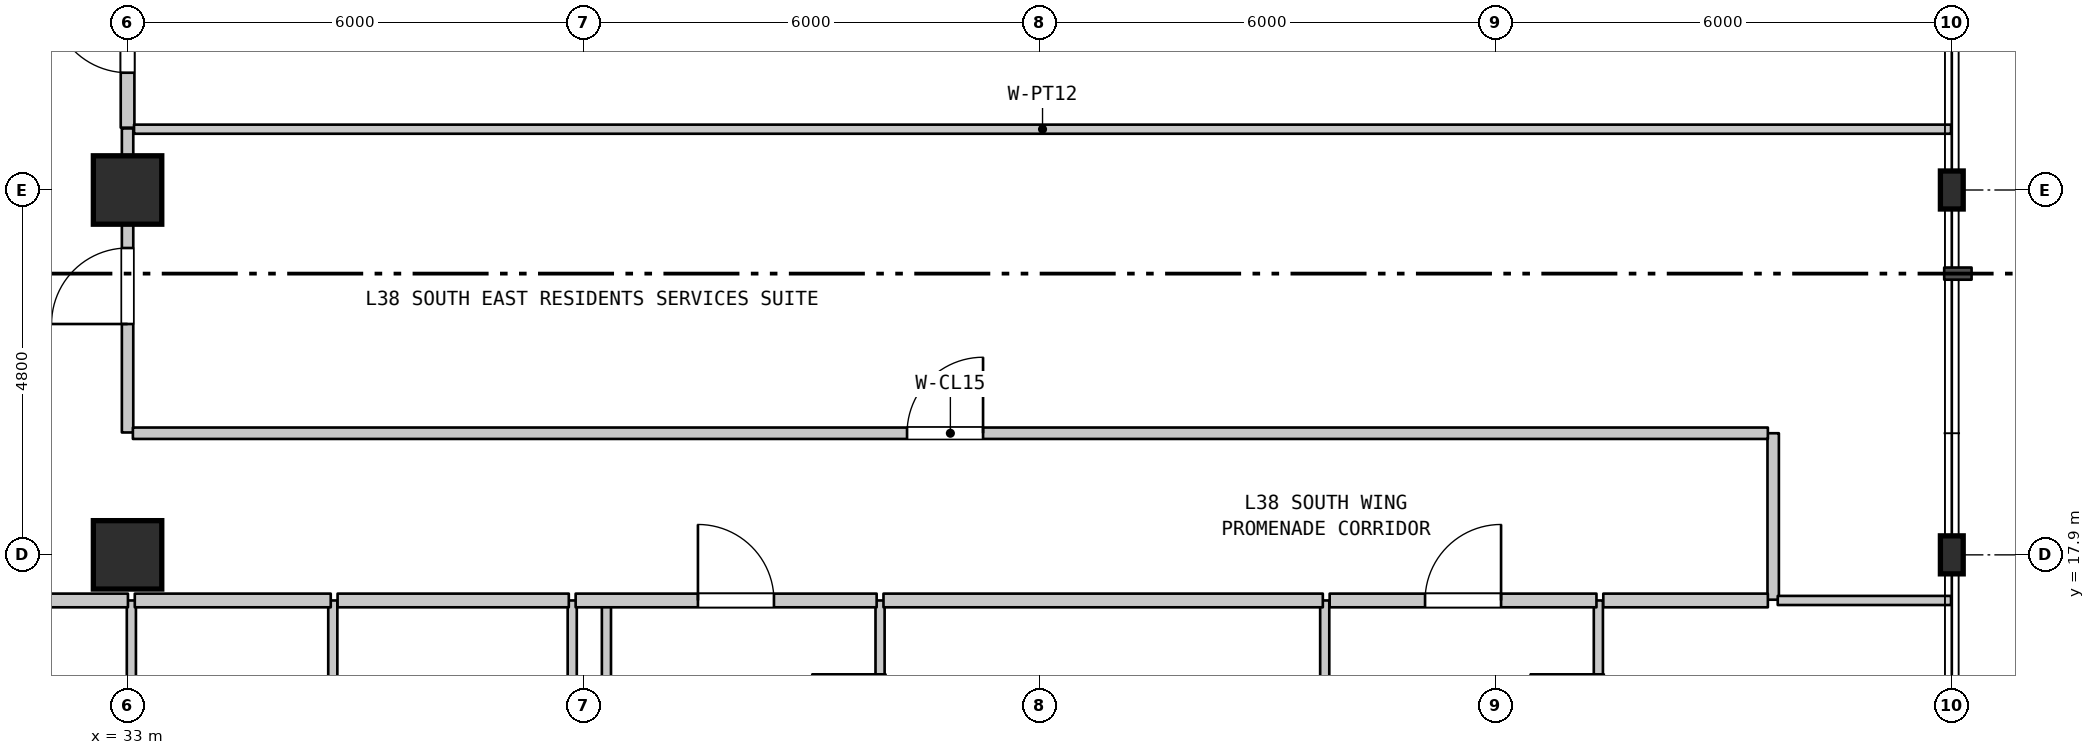
"""IFC4 building model, lengths in metres.
Left out: names, types, materials, properties, quantities, classifications, styles, units other than length and angle.
Written with IfcOpenShell. Run it as: python <this file> out.ifc"""

import sys

from ifc_helpers import new_model, si_unit, direction, frame, frame_2d, origin, origin_2d, place, context, subcontext, project, spatial, rectangle, i_section, extrude, element, fill, save


model = new_model("IFC4")
c1 = context("Model", 3, precision=1e-05, world=origin(), true_north=direction((0.0, 1.0)))
c2 = subcontext(c1, "Body", "Model", "MODEL_VIEW")
j1 = project(units=[si_unit("LENGTHUNIT", "METRE"), si_unit("PLANEANGLEUNIT", "RADIAN")], contexts=[c1])
p1 = place(None, origin())
s1 = spatial("IfcSite", under=j1, at=p1, CompositionType="ELEMENT")
p2 = place(p1, origin())
s2 = spatial("IfcBuilding", under=s1, at=p2, CompositionType="ELEMENT")
p3 = place(p2, frame((0.0, 0.0, 155.7)))
s3 = spatial("IfcBuildingStorey", under=s2, at=p3, CompositionType="ELEMENT", Elevation=155.7)
for number, where, z_axis, x_axis in (
    (1, (33.0, 17.9, 0.0), (0.0, 0.0, 1.0), (1.0, 0.0, 0.0)),
    (2, (33.0, 22.7, 0.0), (0.0, 0.0, 1.0), (1.0, 0.0, 0.0)),
):
    element("IfcColumn", number, at=place(p3, frame(where, z_axis=z_axis, x_axis=x_axis)), inside=s3, PredefinedType="COLUMN", context=c2, shape_type="SweptSolid", body=[
        extrude(rectangle(XDim=0.9, YDim=0.9, at=origin_2d()), origin(), (0.0, 0.0, 1.0), 3.7),
    ])
for number, where, z_axis, x_axis in (
    (3, (57.0, 17.9, 0.0), (0.0, 0.0, 1.0), (1.0, 0.0, 0.0)),
    (4, (57.0, 22.7, 0.0), (0.0, 0.0, 1.0), (1.0, 0.0, 0.0)),
):
    element("IfcColumn", number, at=place(p3, frame(where, z_axis=z_axis, x_axis=x_axis)), inside=s3, PredefinedType="COLUMN", context=c2, shape_type="SweptSolid", body=[
        extrude(i_section(OverallWidth=0.3, OverallDepth=0.5, WebThickness=0.014, FlangeThickness=0.028, FilletRadius=0.027, at=origin_2d()), origin(), (0.0, 0.0, 1.0), 3.7),
    ])
p4 = place(p3, frame((33.0, 19.51, 0.0), z_axis=(0.0, 0.0, 1.0), x_axis=(0.0, 1.0, 0.0)))
e5 = element("IfcWall", 5, at=p4, inside=s3, PredefinedType="STANDARD", context=c2, shape_type="SweptSolid", body=[
    extrude(rectangle(XDim=4.0, YDim=0.15, at=frame_2d((2.0, 0.0))), origin(), (0.0, 0.0, 1.0), 2.78),
])
p5 = place(p4, frame((1.427, 0.0, 0.0)))
e6 = element("IfcOpeningElement", 6, at=p5, cuts=e5, PredefinedType="OPENING", context=c2, shape_type="SweptSolid", body=[
    extrude(rectangle(XDim=1.0, YDim=2.15, at=frame_2d((0.5, 1.075))), frame((0.0, 0.085, 0.0), z_axis=(0.0, -1.0, 0.0), x_axis=(1.0, 0.0, 0.0)), (0.0, 0.0, 1.0), 0.17),
])
p6 = place(p3, frame((33.0, 23.52, 0.0), z_axis=(0.0, 0.0, 1.0), x_axis=(0.0, 1.0, 0.0)))
e7 = element("IfcWall", 7, at=p6, inside=s3, PredefinedType="STANDARD", context=c2, shape_type="SweptSolid", body=[
    extrude(rectangle(XDim=2.6, YDim=0.18, at=frame_2d((1.3, 0.0))), origin(), (0.0, 0.0, 1.0), 2.78),
])
p7 = place(p6, frame((0.723, 0.0, 0.0)))
e8 = element("IfcOpeningElement", 8, at=p7, cuts=e7, PredefinedType="OPENING", context=c2, shape_type="SweptSolid", body=[
    extrude(rectangle(XDim=1.0, YDim=2.15, at=frame_2d((0.5, 1.075))), frame((0.0, 0.1, 0.0), z_axis=(0.0, -1.0, 0.0), x_axis=(1.0, 0.0, 0.0)), (0.0, 0.0, 1.0), 0.2),
])
p8 = place(p3, frame((33.05, 11.15, 0.0), z_axis=(0.0, 0.0, 1.0), x_axis=(0.0, 1.0, 0.0)))
e9 = element("IfcWall", 9, at=p8, inside=s3, PredefinedType="PARTITIONING", context=c2, shape_type="SweptSolid", body=[
    extrude(rectangle(XDim=6.15, YDim=0.12, at=frame_2d((3.075, 0.0))), origin(), (0.0, 0.0, 1.0), 2.78),
])
for number, where, z_axis, x_axis in (
    (10, (35.7, 11.15, 0.0), (0.0, 0.0, 1.0), (0.0, 1.0, 0.0)),
    (11, (38.85, 11.15, 0.0), (0.0, 0.0, 1.0), (0.0, 1.0, 0.0)),
):
    element("IfcWall", number, at=place(p3, frame(where, z_axis=z_axis, x_axis=x_axis)), inside=s3, PredefinedType="PARTITIONING", context=c2, shape_type="SweptSolid", body=[
        extrude(rectangle(XDim=6.15, YDim=0.12, at=frame_2d((3.075, 0.0))), origin(), (0.0, 0.0, 1.0), 3.28),
    ])
p9 = place(p3, frame((39.3, 0.71, 0.0), z_axis=(0.0, 0.0, 1.0), x_axis=(0.0, 1.0, 0.0)))
e12 = element("IfcWall", 12, at=p9, inside=s3, PredefinedType="PARTITIONING", context=c2, shape_type="SweptSolid", body=[
    extrude(rectangle(XDim=16.59, YDim=0.12, at=frame_2d((8.295, 0.0))), origin(), (0.0, 0.0, 1.0), 3.28),
])
p10 = place(p3, frame((42.9, 14.6, 0.0), z_axis=(0.0, 0.0, 1.0), x_axis=(0.0, 1.0, 0.0)))
e13 = element("IfcWall", 13, at=p10, inside=s3, PredefinedType="PARTITIONING", context=c2, shape_type="SweptSolid", body=[
    extrude(rectangle(XDim=2.7, YDim=0.12, at=frame_2d((1.35, 0.0))), origin(), (0.0, 0.0, 1.0), 3.28),
])
p11 = place(p10, frame((0.828, 0.0, 0.0)))
e14 = element("IfcOpeningElement", 14, at=p11, cuts=e13, PredefinedType="OPENING", context=c2, shape_type="SweptSolid", body=[
    extrude(rectangle(XDim=0.9, YDim=2.1, at=frame_2d((0.45, 1.05))), frame((0.0, 0.07, 0.0), z_axis=(0.0, -1.0, 0.0), x_axis=(1.0, 0.0, 0.0)), (0.0, 0.0, 1.0), 0.14),
])
p12 = place(p3, frame((48.75, 14.6, 0.0), z_axis=(0.0, 0.0, 1.0), x_axis=(0.0, 1.0, 0.0)))
e15 = element("IfcWall", 15, at=p12, inside=s3, PredefinedType="PARTITIONING", context=c2, shape_type="SweptSolid", body=[
    extrude(rectangle(XDim=2.7, YDim=0.12, at=frame_2d((1.35, 0.0))), origin(), (0.0, 0.0, 1.0), 3.28),
])
p13 = place(p3, frame((52.35, 14.6, 0.0), z_axis=(0.0, 0.0, 1.0), x_axis=(0.0, 1.0, 0.0)))
e16 = element("IfcWall", 16, at=p13, inside=s3, PredefinedType="PARTITIONING", context=c2, shape_type="SweptSolid", body=[
    extrude(rectangle(XDim=2.7, YDim=0.12, at=frame_2d((1.35, 0.0))), origin(), (0.0, 0.0, 1.0), 3.28),
])
p14 = place(p13, frame((0.828, 0.0, 0.0)))
e17 = element("IfcOpeningElement", 17, at=p14, cuts=e16, PredefinedType="OPENING", context=c2, shape_type="SweptSolid", body=[
    extrude(rectangle(XDim=0.9, YDim=2.1, at=frame_2d((0.45, 1.05))), frame((0.0, 0.07, 0.0), z_axis=(0.0, -1.0, 0.0), x_axis=(1.0, 0.0, 0.0)), (0.0, 0.0, 1.0), 0.14),
])
p15 = place(p3, frame((54.65, 17.31, 0.0), z_axis=(0.0, 0.0, 1.0), x_axis=(0.0, 1.0, 0.0)))
e18 = element("IfcWall", 18, at=p15, inside=s3, PredefinedType="STANDARD", context=c2, shape_type="SweptSolid", body=[
    extrude(rectangle(XDim=2.19, YDim=0.15, at=frame_2d((1.095, 0.0))), origin(), (0.0, 0.0, 1.0), 3.28),
])
p16 = place(p3, frame((29.045, 17.3, 0.0), z_axis=(0.0, 0.0, 1.0), x_axis=(1.0, 0.0, 0.0)))
e19 = element("IfcWall", 19, at=p16, inside=s3, PredefinedType="STANDARD", context=c2, shape_type="SweptSolid", body=[
    extrude(rectangle(XDim=3.96, YDim=0.18, at=frame_2d((1.98, 0.0))), origin(), (0.0, 0.0, 1.0), 3.28),
])
p17 = place(p16, frame((1.48, 0.0, 0.0)))
e20 = element("IfcOpeningElement", 20, at=p17, cuts=e19, PredefinedType="OPENING", context=c2, shape_type="SweptSolid", body=[
    extrude(rectangle(XDim=1.0, YDim=2.15, at=frame_2d((0.5, 1.075))), frame((0.0, 0.1, 0.0), z_axis=(0.0, -1.0, 0.0), x_axis=(1.0, 0.0, 0.0)), (0.0, 0.0, 1.0), 0.2),
])
p18 = place(p3, frame((33.095, 17.3, 0.0), z_axis=(0.0, 0.0, 1.0), x_axis=(1.0, 0.0, 0.0)))
e21 = element("IfcWall", 21, at=p18, inside=s3, PredefinedType="STANDARD", context=c2, shape_type="SweptSolid", body=[
    extrude(rectangle(XDim=2.578, YDim=0.18, at=frame_2d((1.289, 0.0))), origin(), (0.0, 0.0, 1.0), 3.28),
])
p19 = place(p3, frame((35.763, 17.3, 0.0), z_axis=(0.0, 0.0, 1.0), x_axis=(1.0, 0.0, 0.0)))
e22 = element("IfcWall", 22, at=p19, inside=s3, PredefinedType="STANDARD", context=c2, shape_type="SweptSolid", body=[
    extrude(rectangle(XDim=3.042, YDim=0.18, at=frame_2d((1.521, 0.0))), origin(), (0.0, 0.0, 1.0), 3.28),
])
p20 = place(p3, frame((38.895, 17.3, 0.0), z_axis=(0.0, 0.0, 1.0), x_axis=(1.0, 0.0, 0.0)))
e23 = element("IfcWall", 23, at=p20, inside=s3, PredefinedType="STANDARD", context=c2, shape_type="SweptSolid", body=[
    extrude(rectangle(XDim=3.96, YDim=0.18, at=frame_2d((1.98, 0.0))), origin(), (0.0, 0.0, 1.0), 3.28),
])
p21 = place(p20, frame((1.609, 0.0, 0.0)))
e24 = element("IfcOpeningElement", 24, at=p21, cuts=e23, PredefinedType="OPENING", context=c2, shape_type="SweptSolid", body=[
    extrude(rectangle(XDim=1.0, YDim=2.15, at=frame_2d((0.5, 1.075))), frame((0.0, 0.1, 0.0), z_axis=(0.0, -1.0, 0.0), x_axis=(1.0, 0.0, 0.0)), (0.0, 0.0, 1.0), 0.2),
])
p22 = place(p3, frame((42.945, 17.3, 0.0), z_axis=(0.0, 0.0, 1.0), x_axis=(1.0, 0.0, 0.0)))
e25 = element("IfcWall", 25, at=p22, inside=s3, PredefinedType="STANDARD", context=c2, shape_type="SweptSolid", body=[
    extrude(rectangle(XDim=5.78, YDim=0.18, at=frame_2d((2.89, 0.0))), origin(), (0.0, 0.0, 1.0), 3.28),
])
p23 = place(p3, frame((48.815, 17.3, 0.0), z_axis=(0.0, 0.0, 1.0), x_axis=(1.0, 0.0, 0.0)))
e26 = element("IfcWall", 26, at=p23, inside=s3, PredefinedType="STANDARD", context=c2, shape_type="SweptSolid", body=[
    extrude(rectangle(XDim=3.51, YDim=0.18, at=frame_2d((1.755, 0.0))), origin(), (0.0, 0.0, 1.0), 3.28),
])
p24 = place(p23, frame((1.255, 0.0, 0.0)))
e27 = element("IfcOpeningElement", 27, at=p24, cuts=e26, PredefinedType="OPENING", context=c2, shape_type="SweptSolid", body=[
    extrude(rectangle(XDim=1.0, YDim=2.15, at=frame_2d((0.5, 1.075))), frame((0.0, 0.1, 0.0), z_axis=(0.0, -1.0, 0.0), x_axis=(1.0, 0.0, 0.0)), (0.0, 0.0, 1.0), 0.2),
])
p25 = place(p3, frame((52.415, 17.3, 0.0), z_axis=(0.0, 0.0, 1.0), x_axis=(1.0, 0.0, 0.0)))
e28 = element("IfcWall", 28, at=p25, inside=s3, PredefinedType="STANDARD", context=c2, shape_type="SweptSolid", body=[
    extrude(rectangle(XDim=2.165, YDim=0.18, at=frame_2d((1.083, 0.0))), origin(), (0.0, 0.0, 1.0), 3.28),
])
p26 = place(p3, frame((54.71, 17.3, 0.0), z_axis=(0.0, 0.0, 1.0), x_axis=(1.0, 0.0, 0.0)))
e29 = element("IfcWall", 29, at=p26, inside=s3, PredefinedType="PARTITIONING", context=c2, shape_type="SweptSolid", body=[
    extrude(rectangle(XDim=2.28, YDim=0.12, at=frame_2d((1.14, 0.0))), origin(), (0.0, 0.0, 1.0), 3.28),
])
p27 = place(p3, frame((33.07, 19.5, 0.0), z_axis=(0.0, 0.0, 1.0), x_axis=(1.0, 0.0, 0.0)))
e30 = element("IfcWall", 30, at=p27, inside=s3, PredefinedType="STANDARD", context=c2, shape_type="SweptSolid", body=[
    extrude(rectangle(XDim=21.51, YDim=0.15, at=frame_2d((10.755, 0.0))), origin(), (0.0, 0.0, 1.0), 3.28),
])
p28 = place(p27, frame((10.185, 0.0, 0.0)))
e31 = element("IfcOpeningElement", 31, at=p28, cuts=e30, PredefinedType="OPENING", context=c2, shape_type="SweptSolid", body=[
    extrude(rectangle(XDim=1.0, YDim=2.15, at=frame_2d((0.5, 1.075))), frame((0.0, 0.085, 0.0), z_axis=(0.0, -1.0, 0.0), x_axis=(1.0, 0.0, 0.0)), (0.0, 0.0, 1.0), 0.17),
])
p29 = place(p3, frame((33.085, 23.5, 0.0), z_axis=(0.0, 0.0, 1.0), x_axis=(1.0, 0.0, 0.0)))
e32 = element("IfcWall", 32, at=p29, inside=s3, PredefinedType="PARTITIONING", context=c2, shape_type="SweptSolid", body=[
    extrude(rectangle(XDim=23.905, YDim=0.12, at=frame_2d((11.953, 0.0))), origin(), (0.0, 0.0, 1.0), 3.28),
])
p30 = place(p5, origin())
e33 = element("IfcDoor", 33, at=p30, inside=s3, OperationType="SINGLE_SWING_LEFT", PredefinedType="DOOR", context=c2, shape_type="SweptSolid", body=[
    extrude(rectangle(XDim=1.0, YDim=2.15, at=frame_2d((0.5, 1.075))), frame((0.0, 0.025, 0.0), z_axis=(0.0, -1.0, 0.0), x_axis=(1.0, 0.0, 0.0)), (0.0, 0.0, 1.0), 0.05),
])
fill(e6, e33)
p31 = place(p7, origin())
e34 = element("IfcDoor", 34, at=p31, inside=s3, OperationType="SINGLE_SWING_RIGHT", PredefinedType="DOOR", context=c2, shape_type="SweptSolid", body=[
    extrude(rectangle(XDim=1.0, YDim=2.15, at=frame_2d((0.5, 1.075))), frame((0.0, 0.025, 0.0), z_axis=(0.0, -1.0, 0.0), x_axis=(1.0, 0.0, 0.0)), (0.0, 0.0, 1.0), 0.05),
])
fill(e8, e34)
p32 = place(p11, origin())
e35 = element("IfcDoor", 35, at=p32, inside=s3, OperationType="SINGLE_SWING_RIGHT", PredefinedType="DOOR", context=c2, shape_type="SweptSolid", body=[
    extrude(rectangle(XDim=0.9, YDim=2.1, at=frame_2d((0.45, 1.05))), frame((0.0, 0.025, 0.0), z_axis=(0.0, -1.0, 0.0), x_axis=(1.0, 0.0, 0.0)), (0.0, 0.0, 1.0), 0.05),
])
fill(e14, e35)
p33 = place(p14, origin())
e36 = element("IfcDoor", 36, at=p33, inside=s3, OperationType="SINGLE_SWING_RIGHT", PredefinedType="DOOR", context=c2, shape_type="SweptSolid", body=[
    extrude(rectangle(XDim=0.9, YDim=2.1, at=frame_2d((0.45, 1.05))), frame((0.0, 0.025, 0.0), z_axis=(0.0, -1.0, 0.0), x_axis=(1.0, 0.0, 0.0)), (0.0, 0.0, 1.0), 0.05),
])
fill(e17, e36)
p34 = place(p21, origin())
e37 = element("IfcDoor", 37, at=p34, inside=s3, OperationType="SINGLE_SWING_LEFT", PredefinedType="DOOR", context=c2, shape_type="SweptSolid", body=[
    extrude(rectangle(XDim=1.0, YDim=2.15, at=frame_2d((0.5, 1.075))), frame((0.0, 0.025, 0.0), z_axis=(0.0, -1.0, 0.0), x_axis=(1.0, 0.0, 0.0)), (0.0, 0.0, 1.0), 0.05),
])
fill(e24, e37)
p35 = place(p24, origin())
e38 = element("IfcDoor", 38, at=p35, inside=s3, OperationType="SINGLE_SWING_RIGHT", PredefinedType="DOOR", context=c2, shape_type="SweptSolid", body=[
    extrude(rectangle(XDim=1.0, YDim=2.15, at=frame_2d((0.5, 1.075))), frame((0.0, 0.025, 0.0), z_axis=(0.0, -1.0, 0.0), x_axis=(1.0, 0.0, 0.0)), (0.0, 0.0, 1.0), 0.05),
])
fill(e27, e38)
p36 = place(p28, origin())
e39 = element("IfcDoor", 39, at=p36, inside=s3, OperationType="SINGLE_SWING_RIGHT", PredefinedType="DOOR", context=c2, shape_type="SweptSolid", body=[
    extrude(rectangle(XDim=1.0, YDim=2.15, at=frame_2d((0.5, 1.075))), frame((0.0, 0.025, 0.0), z_axis=(0.0, -1.0, 0.0), x_axis=(1.0, 0.0, 0.0)), (0.0, 0.0, 1.0), 0.05),
])
fill(e31, e39)
save(model, sys.argv[1])
